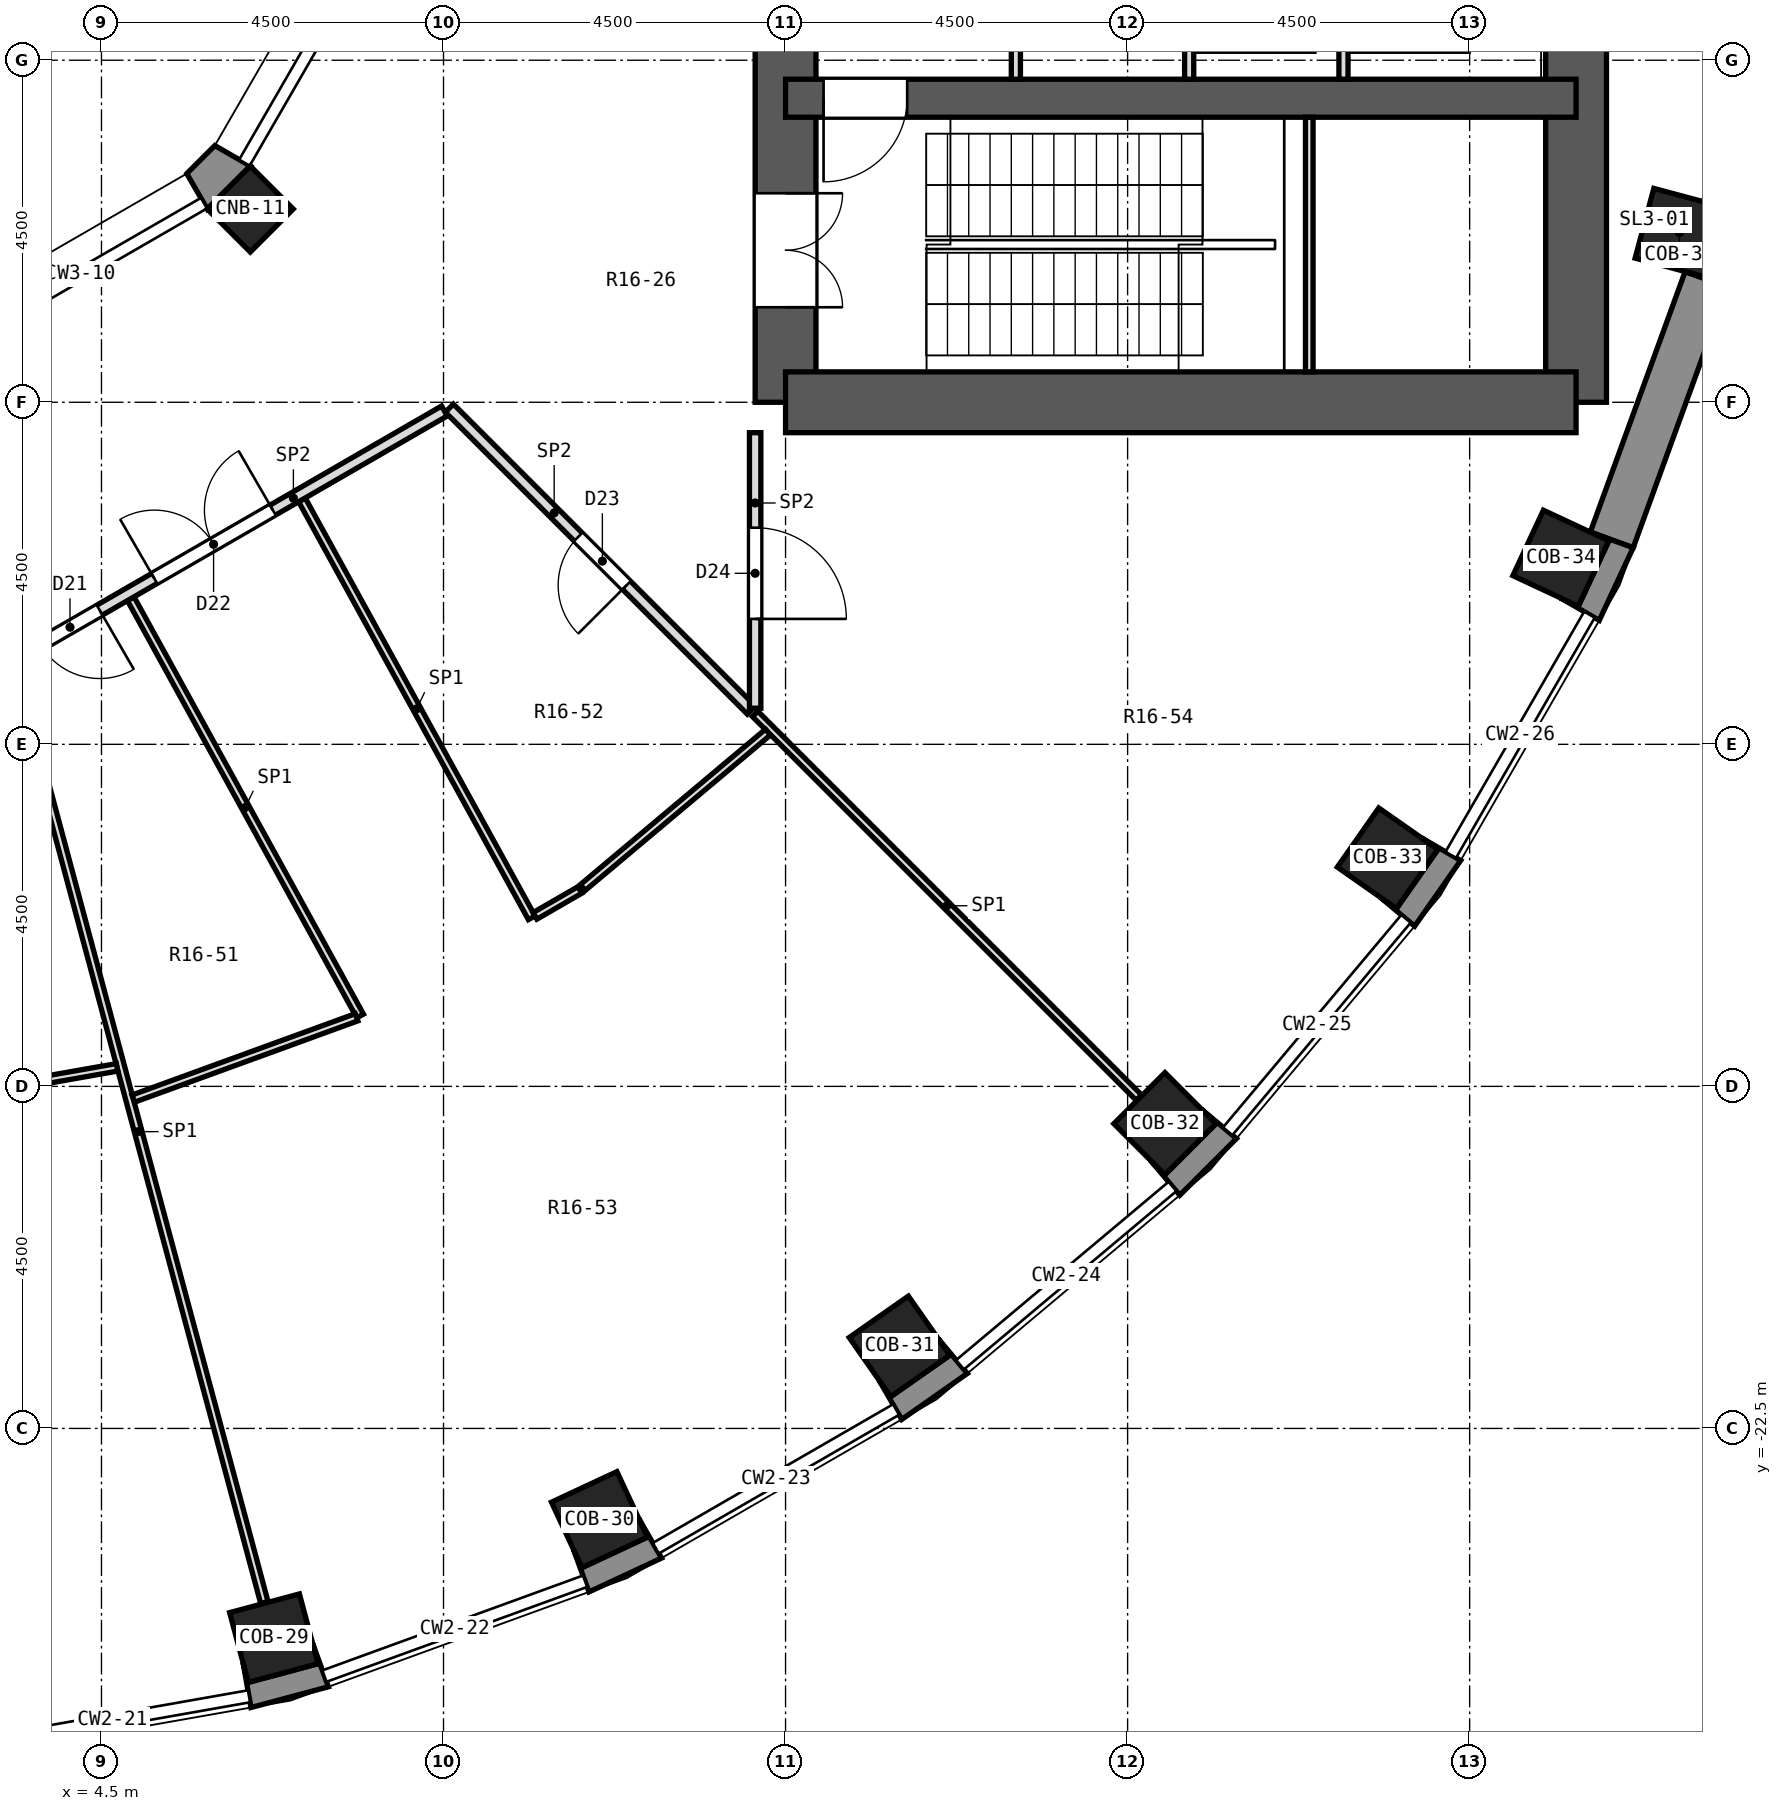
"""IFC4 building model, lengths in metres.
Left out: names, types, materials, properties, quantities, classifications, styles, units other than length and angle.
Written with IfcOpenShell. Run it as: python <this file> out.ifc"""

import sys

from ifc_helpers import new_model, si_unit, direction, frame, frame_2d, origin, origin_2d, place, context, subcontext, project, spatial, polyline, rectangle, outline, extrude, element, fill, save


model = new_model("IFC4")
c1 = context("Model", 3, precision=1e-05, world=origin(), true_north=direction((0.0, 1.0)))
c2 = subcontext(c1, "Body", "Model", "MODEL_VIEW")
j1 = project(units=[si_unit("LENGTHUNIT", "METRE"), si_unit("PLANEANGLEUNIT", "RADIAN")], contexts=[c1])
p1 = place(None, origin())
s1 = spatial("IfcSite", under=j1, at=p1, CompositionType="ELEMENT")
p2 = place(p1, origin())
s2 = spatial("IfcBuilding", under=s1, at=p2, CompositionType="ELEMENT")
p3 = place(p2, frame((0.0, 0.0, 86.9)))
s3 = spatial("IfcBuildingStorey", under=s2, at=p3, CompositionType="ELEMENT", Elevation=86.9)
for number, where, z_axis, x_axis in (
    (1, (6.768, -25.259, -0.55), (0.0, 0.0, 1.0), (0.259, -0.966, 0.0)),
    (2, (11.052, -23.7, -0.55), (0.0, 0.0, 1.0), (0.423, -0.906, 0.0)),
    (3, (14.999, -21.421, -0.55), (0.0, 0.0, 1.0), (0.574, -0.819, 0.0)),
    (4, (18.491, -18.491, -0.55), (0.0, 0.0, 1.0), (0.707, -0.707, 0.0)),
    (5, (21.421, -14.999, -0.55), (0.0, 0.0, 1.0), (0.819, -0.574, 0.0)),
    (6, (23.7, -11.052, -0.55), (0.0, 0.0, 1.0), (0.906, -0.423, 0.0)),
    (7, (25.259, -6.768, -0.55), (0.0, 0.0, 1.0), (0.966, -0.259, 0.0)),
):
    element("IfcColumn", number, at=place(p3, frame(where, z_axis=z_axis, x_axis=x_axis)), inside=s3, PredefinedType="COLUMN", context=c2, shape_type="SweptSolid", body=[
        extrude(rectangle(XDim=0.95, YDim=0.95, at=origin_2d()), origin(), (0.0, 0.0, 1.0), 5.55),
    ])
p4 = place(p3, frame((6.458, -6.458, 0.0), z_axis=(0.0, 0.0, 1.0), x_axis=(0.707106781187, -0.707106781187, 0.0)))
e8 = element("IfcColumn", 8, at=p4, inside=s3, PredefinedType="COLUMN", context=c2, shape_type="SweptSolid", body=[
    extrude(rectangle(XDim=0.8, YDim=0.8, at=origin_2d()), origin(), (0.0, 0.0, 1.0), 5.0),
])
p5 = place(p3, frame((13.5, -9.0, 0.0), z_axis=(0.0, 0.0, 1.0), x_axis=(0.0, 1.0, 0.0)))
e9 = element("IfcWall", 9, at=p5, inside=s3, PredefinedType="SHEAR", context=c2, shape_type="SweptSolid", body=[
    extrude(rectangle(XDim=18.0, YDim=0.8, at=frame_2d((9.0, 0.0))), origin(), (0.0, 0.0, 1.0), 5.0),
])
p6 = place(p5, frame((15.25, 0.0, 0.0)))
e10 = element("IfcOpeningElement", 10, at=p6, cuts=e9, PredefinedType="OPENING", context=c2, shape_type="SweptSolid", body=[
    extrude(rectangle(XDim=1.5, YDim=2.1, at=frame_2d((0.75, 1.05))), frame((0.0, 0.412, 0.0), z_axis=(0.0, -1.0, 0.0), x_axis=(1.0, 0.0, 0.0)), (0.0, 0.0, 1.0), 0.824),
])
p7 = place(p5, frame((1.25, 0.0, 0.0)))
e11 = element("IfcOpeningElement", 11, at=p7, cuts=e9, PredefinedType="OPENING", context=c2, shape_type="SweptSolid", body=[
    extrude(rectangle(XDim=1.5, YDim=2.1, at=frame_2d((0.75, 1.05))), frame((0.0, 0.412, 0.0), z_axis=(0.0, -1.0, 0.0), x_axis=(1.0, 0.0, 0.0)), (0.0, 0.0, 1.0), 0.824),
])
p8 = place(p5, frame((7.5, 0.0, 0.0)))
e12 = element("IfcOpeningElement", 12, at=p8, cuts=e9, PredefinedType="OPENING", context=c2, shape_type="SweptSolid", body=[
    extrude(rectangle(XDim=3.0, YDim=2.4, at=frame_2d((1.5, 1.2))), frame((0.0, 0.412, 0.0), z_axis=(0.0, -1.0, 0.0), x_axis=(1.0, 0.0, 0.0)), (0.0, 0.0, 1.0), 0.824),
])
p9 = place(p3, frame((23.9, -9.0, 0.0), z_axis=(0.0, 0.0, 1.0), x_axis=(0.0, 1.0, 0.0)))
e13 = element("IfcWall", 13, at=p9, inside=s3, PredefinedType="SHEAR", context=c2, shape_type="SweptSolid", body=[
    extrude(rectangle(XDim=18.0, YDim=0.8, at=frame_2d((9.0, 0.0))), origin(), (0.0, 0.0, 1.0), 5.0),
])
p10 = place(p3, frame((13.5, -9.0, 0.0), z_axis=(0.0, 0.0, 1.0), x_axis=(1.0, 0.0, 0.0)))
e14 = element("IfcWall", 14, at=p10, inside=s3, PredefinedType="SHEAR", context=c2, shape_type="SweptSolid", body=[
    extrude(rectangle(XDim=10.4, YDim=0.8, at=frame_2d((5.2, 0.0))), origin(), (0.0, 0.0, 1.0), 5.0),
])
p11 = place(p3, frame((13.5, -5.0, 0.0), z_axis=(0.0, 0.0, 1.0), x_axis=(1.0, 0.0, 0.0)))
e15 = element("IfcWall", 15, at=p11, inside=s3, PredefinedType="SHEAR", context=c2, shape_type="SweptSolid", body=[
    extrude(rectangle(XDim=10.4, YDim=0.5, at=frame_2d((5.2, 0.0))), origin(), (0.0, 0.0, 1.0), 5.0),
])
p12 = place(p11, frame((0.5, 0.0, 0.0)))
e16 = element("IfcOpeningElement", 16, at=p12, cuts=e15, PredefinedType="OPENING", context=c2, shape_type="SweptSolid", body=[
    extrude(rectangle(XDim=1.1, YDim=2.1, at=frame_2d((0.55, 1.05))), frame((0.0, 0.262, 0.0), z_axis=(0.0, -1.0, 0.0), x_axis=(1.0, 0.0, 0.0)), (0.0, 0.0, 1.0), 0.524),
])
p13 = place(p3, frame((24.369, -10.811, 0.0), z_axis=(0.0, 0.0, 1.0), x_axis=(0.341990236633, 0.939703505393, 0.0)))
e17 = element("IfcWall", 17, at=p13, inside=s3, PredefinedType="SOLIDWALL", context=c2, shape_type="SweptSolid", body=[
    extrude(rectangle(XDim=3.648, YDim=0.6, at=frame_2d((1.824, 0.0))), origin(), (0.0, 0.0, 1.0), 4.5),
])
p14 = place(p3, origin())
e18 = element("IfcWall", 18, at=p14, inside=s3, PredefinedType="SOLIDWALL", context=c2, shape_type="SweptSolid", body=[
    extrude(outline(polyline([(6.467, -26.172), (7.486, -25.899), (7.28, -25.335), (7.35, -25.595), (6.432, -25.841), (6.363, -25.581), (6.467, -26.172)])), origin(), (0.0, 0.0, 1.0), 4.5),
])
p15 = place(p3, origin())
e19 = element("IfcWall", 19, at=p15, inside=s3, PredefinedType="SOLIDWALL", context=c2, shape_type="SweptSolid", body=[
    extrude(outline(polyline([(10.913, -24.651), (11.869, -24.206), (11.569, -23.686), (11.683, -23.93), (10.822, -24.331), (10.708, -24.087), (10.913, -24.651)])), origin(), (0.0, 0.0, 1.0), 4.5),
])
p16 = place(p3, origin())
e20 = element("IfcWall", 20, at=p16, inside=s3, PredefinedType="SOLIDWALL", context=c2, shape_type="SweptSolid", body=[
    extrude(outline(polyline([(15.892, -21.777), (15.506, -21.317), (15.661, -21.538), (14.882, -22.083), (14.728, -21.862), (15.028, -22.382), (15.892, -21.777)])), origin(), (0.0, 0.0, 1.0), 4.5),
])
p17 = place(p3, origin())
e21 = element("IfcWall", 21, at=p17, inside=s3, PredefinedType="SOLIDWALL", context=c2, shape_type="SweptSolid", body=[
    extrude(outline(polyline([(18.686, -19.432), (19.432, -18.686), (18.972, -18.301), (19.163, -18.491), (18.491, -19.163), (18.301, -18.972), (18.686, -19.432)])), origin(), (0.0, 0.0, 1.0), 4.5),
])
p18 = place(p3, origin())
e22 = element("IfcWall", 22, at=p18, inside=s3, PredefinedType="SOLIDWALL", context=c2, shape_type="SweptSolid", body=[
    extrude(outline(polyline([(22.382, -15.028), (21.862, -14.728), (22.083, -14.882), (21.538, -15.661), (21.317, -15.506), (21.777, -15.892), (22.382, -15.028)])), origin(), (0.0, 0.0, 1.0), 4.5),
])
p19 = place(p3, origin())
e23 = element("IfcWall", 23, at=p19, inside=s3, PredefinedType="SOLIDWALL", context=c2, shape_type="SweptSolid", body=[
    extrude(outline(polyline([(24.651, -10.913), (24.087, -10.708), (24.331, -10.822), (23.93, -11.683), (23.686, -11.569), (24.206, -11.869), (24.651, -10.913)])), origin(), (0.0, 0.0, 1.0), 4.5),
])
p20 = place(p3, origin())
e24 = element("IfcWall", 24, at=p20, inside=s3, PredefinedType="SOLIDWALL", context=c2, shape_type="SweptSolid", body=[
    extrude(outline(polyline([(25.899, -7.486), (26.172, -6.467), (25.581, -6.363), (25.841, -6.432), (25.595, -7.35), (25.335, -7.28), (25.899, -7.486)])), origin(), (0.0, 0.0, 1.0), 4.5),
])
p21 = place(p3, origin())
e25 = element("IfcWall", 25, at=p21, inside=s3, PredefinedType="SOLIDWALL", context=c2, shape_type="SweptSolid", body=[
    extrude(outline(polyline([(5.892, -6.458), (6.458, -5.892), (5.991, -5.623), (5.623, -5.991), (5.892, -6.458)])), origin(), (0.0, 0.0, 1.0), 4.5),
])
p22 = place(p3, frame((3.323, -12.4, 0.0), z_axis=(0.0, 0.0, 1.0), x_axis=(0.258784286108, -0.965935139263, 0.0)))
e26 = element("IfcWall", 26, at=p22, inside=s3, PredefinedType="PARTITIONING", context=c2, shape_type="SweptSolid", body=[
    extrude(rectangle(XDim=12.828, YDim=0.1, at=frame_2d((6.414, 0.0))), origin(), (0.0, 0.0, 1.0), 4.5),
])
p23 = place(p3, frame((4.885, -11.585, 0.0), z_axis=(0.0, 0.0, 1.0), x_axis=(0.481793071414, -0.876285020035, 0.0)))
e27 = element("IfcWall", 27, at=p23, inside=s3, PredefinedType="PARTITIONING", context=c2, shape_type="SweptSolid", body=[
    extrude(rectangle(XDim=6.264, YDim=0.1, at=frame_2d((3.132, 0.0))), origin(), (0.0, 0.0, 1.0), 4.5),
])
p24 = place(p3, frame((7.137, -10.284, 0.0), z_axis=(0.0, 0.0, 1.0), x_axis=(0.481752941383, -0.876307082859, 0.0)))
e28 = element("IfcWall", 28, at=p24, inside=s3, PredefinedType="PARTITIONING", context=c2, shape_type="SweptSolid", body=[
    extrude(rectangle(XDim=6.274, YDim=0.1, at=frame_2d((3.137, 0.0))), origin(), (0.0, 0.0, 1.0), 4.5),
])
p25 = place(p3, frame((13.1, -13.1, 0.0), z_axis=(0.0, 0.0, 1.0), x_axis=(0.707106781187, -0.707106781187, 0.0)))
e29 = element("IfcWall", 29, at=p25, inside=s3, PredefinedType="PARTITIONING", context=c2, shape_type="SweptSolid", body=[
    extrude(rectangle(XDim=7.139, YDim=0.1, at=frame_2d((3.569, 0.0))), origin(), (0.0, 0.0, 1.0), 4.5),
])
p26 = place(p3, frame((9.077, -9.077, 0.0), z_axis=(0.0, 0.0, 1.0), x_axis=(0.707106781187, -0.707106781187, 0.0)))
e30 = element("IfcWall", 30, at=p26, inside=s3, PredefinedType="PARTITIONING", context=c2, shape_type="SweptSolid", body=[
    extrude(rectangle(XDim=5.62, YDim=0.15, at=frame_2d((2.81, 0.0))), origin(), (0.0, 0.0, 1.0), 4.5),
])
p27 = place(p26, frame((2.396, 0.0, 0.0)))
e31 = element("IfcOpeningElement", 31, at=p27, cuts=e30, PredefinedType="OPENING", context=c2, shape_type="SweptSolid", body=[
    extrude(rectangle(XDim=0.9, YDim=2.1, at=frame_2d((0.45, 1.05))), frame((0.0, 0.087, 0.0), z_axis=(0.0, -1.0, 0.0), x_axis=(1.0, 0.0, 0.0)), (0.0, 0.0, 1.0), 0.174),
])
p28 = place(p3, frame((1.65, -18.288, 0.0), z_axis=(0.0, 0.0, 1.0), x_axis=(0.984810487744, 0.173632667516, 0.0)))
e32 = element("IfcWall", 32, at=p28, inside=s3, PredefinedType="PARTITIONING", context=c2, shape_type="SweptSolid", body=[
    extrude(rectangle(XDim=3.102, YDim=0.1, at=frame_2d((1.551, 0.0))), origin(), (0.0, 0.0, 1.0), 4.5),
])
p29 = place(p3, frame((4.918, -18.161, 0.0), z_axis=(0.0, 0.0, 1.0), x_axis=(0.93964286716, 0.342156809365, 0.0)))
e33 = element("IfcWall", 33, at=p29, inside=s3, PredefinedType="PARTITIONING", context=c2, shape_type="SweptSolid", body=[
    extrude(rectangle(XDim=3.127, YDim=0.1, at=frame_2d((1.563, 0.0))), origin(), (0.0, 0.0, 1.0), 4.5),
])
p30 = place(p3, frame((10.203, -15.757, 0.0), z_axis=(0.0, 0.0, 1.0), x_axis=(0.865964989499, 0.500104626015, 0.0)))
e34 = element("IfcWall", 34, at=p30, inside=s3, PredefinedType="PARTITIONING", context=c2, shape_type="SweptSolid", body=[
    extrude(rectangle(XDim=0.682, YDim=0.1, at=frame_2d((0.341, 0.0))), origin(), (0.0, 0.0, 1.0), 4.5),
])
p31 = place(p3, frame((3.388, -12.363, 0.0), z_axis=(0.0, 0.0, 1.0), x_axis=(0.865967095912, 0.5001009786, 0.0)))
e35 = element("IfcWall", 35, at=p31, inside=s3, PredefinedType="PARTITIONING", context=c2, shape_type="SweptSolid", body=[
    extrude(rectangle(XDim=6.495, YDim=0.15, at=frame_2d((3.248, 0.0))), origin(), (0.0, 0.0, 1.0), 4.5),
])
p32 = place(p31, frame((0.356, 0.0, 0.0)))
e36 = element("IfcOpeningElement", 36, at=p32, cuts=e35, PredefinedType="OPENING", context=c2, shape_type="SweptSolid", body=[
    extrude(rectangle(XDim=0.9, YDim=2.1, at=frame_2d((0.45, 1.05))), frame((0.0, 0.087, 0.0), z_axis=(0.0, -1.0, 0.0), x_axis=(1.0, 0.0, 0.0)), (0.0, 0.0, 1.0), 0.174),
])
p33 = place(p31, frame((2.087, 0.0, 0.0)))
e37 = element("IfcOpeningElement", 37, at=p33, cuts=e35, PredefinedType="OPENING", context=c2, shape_type="SweptSolid", body=[
    extrude(rectangle(XDim=1.8, YDim=2.1, at=frame_2d((0.9, 1.05))), frame((0.0, 0.087, 0.0), z_axis=(0.0, -1.0, 0.0), x_axis=(1.0, 0.0, 0.0)), (0.0, 0.0, 1.0), 0.174),
])
p34 = place(p3, frame((10.832, -15.384, 0.0), z_axis=(0.0, 0.0, 1.0), x_axis=(0.766014747924, 0.642822997381, 0.0)))
e38 = element("IfcWall", 38, at=p34, inside=s3, PredefinedType="PARTITIONING", context=c2, shape_type="SweptSolid", body=[
    extrude(rectangle(XDim=3.181, YDim=0.1, at=frame_2d((1.59, 0.0))), origin(), (0.0, 0.0, 1.0), 4.5),
])
p35 = place(p3, frame((13.1, -13.025, 0.0), z_axis=(0.0, 0.0, 1.0), x_axis=(0.0, 1.0, 0.0)))
e39 = element("IfcWall", 39, at=p35, inside=s3, PredefinedType="PARTITIONING", context=c2, shape_type="SweptSolid", body=[
    extrude(rectangle(XDim=3.625, YDim=0.15, at=frame_2d((1.812, 0.0))), origin(), (0.0, 0.0, 1.0), 4.5),
])
p36 = place(p35, frame((1.175, 0.0, 0.0)))
e40 = element("IfcOpeningElement", 40, at=p36, cuts=e39, PredefinedType="OPENING", context=c2, shape_type="SweptSolid", body=[
    extrude(rectangle(XDim=1.2, YDim=2.1, at=frame_2d((0.6, 1.05))), frame((0.0, 0.087, 0.0), z_axis=(0.0, -1.0, 0.0), x_axis=(1.0, 0.0, 0.0)), (0.0, 0.0, 1.0), 0.174),
])
p37 = place(p3, frame((16.53, -4.75, 0.0), z_axis=(0.0, 0.0, 1.0), x_axis=(0.0, 1.0, 0.0)))
e41 = element("IfcWall", 41, at=p37, inside=s3, PredefinedType="PARTITIONING", context=c2, shape_type="SweptSolid", body=[
    extrude(rectangle(XDim=2.5, YDim=0.12, at=frame_2d((1.25, 0.0))), origin(), (0.0, 0.0, 1.0), 4.5),
])
p38 = place(p37, frame((0.7, 0.0, 0.0)))
e42 = element("IfcOpeningElement", 42, at=p38, cuts=e41, PredefinedType="OPENING", context=c2, shape_type="SweptSolid", body=[
    extrude(rectangle(XDim=1.1, YDim=2.1, at=frame_2d((0.55, 1.05))), frame((0.0, 0.072, 0.0), z_axis=(0.0, -1.0, 0.0), x_axis=(1.0, 0.0, 0.0)), (0.0, 0.0, 1.0), 0.144),
])
for number, where, z_axis, x_axis in (
    (43, (18.81, -4.75, 0.0), (0.0, 0.0, 1.0), (0.0, 1.0, 0.0)),
    (44, (20.84, -4.75, 0.0), (0.0, 0.0, 1.0), (0.0, 1.0, 0.0)),
):
    element("IfcWall", number, at=place(p3, frame(where, z_axis=z_axis, x_axis=x_axis)), inside=s3, PredefinedType="PARTITIONING", context=c2, shape_type="SweptSolid", body=[
        extrude(rectangle(XDim=2.5, YDim=0.12, at=frame_2d((1.25, 0.0))), origin(), (0.0, 0.0, 1.0), 4.5),
    ])
p39 = place(p3, frame((20.39, -8.6, 0.0), z_axis=(0.0, 0.0, 1.0), x_axis=(0.0, 1.0, 0.0)))
e45 = element("IfcWall", 45, at=p39, inside=s3, PredefinedType="PARTITIONING", context=c2, shape_type="SweptSolid", body=[
    extrude(rectangle(XDim=3.35, YDim=0.1, at=frame_2d((1.675, 0.0))), origin(), (0.0, 0.0, 1.0), 4.5),
])
p40 = place(p32, frame((0.9, 0.0, 0.0), z_axis=(0.0, 0.0, 1.0), x_axis=(-1.0, 0.0, 0.0)))
e46 = element("IfcDoor", 46, at=p40, inside=s3, OperationType="SINGLE_SWING_LEFT", PredefinedType="DOOR", context=c2, shape_type="SweptSolid", body=[
    extrude(rectangle(XDim=0.9, YDim=2.1, at=frame_2d((0.45, 1.05))), frame((0.0, 0.025, 0.0), z_axis=(0.0, -1.0, 0.0), x_axis=(1.0, 0.0, 0.0)), (0.0, 0.0, 1.0), 0.05),
])
fill(e36, e46)
p41 = place(p33, origin())
e47 = element("IfcDoor", 47, at=p41, inside=s3, OperationType="DOUBLE_DOOR_SINGLE_SWING", PredefinedType="DOOR", context=c2, shape_type="SweptSolid", body=[
    extrude(rectangle(XDim=1.8, YDim=2.1, at=frame_2d((0.9, 1.05))), frame((0.0, 0.025, 0.0), z_axis=(0.0, -1.0, 0.0), x_axis=(1.0, 0.0, 0.0)), (0.0, 0.0, 1.0), 0.05),
])
fill(e37, e47)
p42 = place(p27, frame((0.9, 0.0, 0.0), z_axis=(0.0, 0.0, 1.0), x_axis=(-1.0, 0.0, 0.0)))
e48 = element("IfcDoor", 48, at=p42, inside=s3, OperationType="SINGLE_SWING_LEFT", PredefinedType="DOOR", context=c2, shape_type="SweptSolid", body=[
    extrude(rectangle(XDim=0.9, YDim=2.1, at=frame_2d((0.45, 1.05))), frame((0.0, 0.025, 0.0), z_axis=(0.0, -1.0, 0.0), x_axis=(1.0, 0.0, 0.0)), (0.0, 0.0, 1.0), 0.05),
])
fill(e31, e48)
p43 = place(p36, frame((1.2, 0.0, 0.0), z_axis=(0.0, 0.0, 1.0), x_axis=(-1.0, 0.0, 0.0)))
e49 = element("IfcDoor", 49, at=p43, inside=s3, OperationType="SINGLE_SWING_RIGHT", PredefinedType="DOOR", context=c2, shape_type="SweptSolid", body=[
    extrude(rectangle(XDim=1.2, YDim=2.1, at=frame_2d((0.6, 1.05))), frame((0.0, 0.025, 0.0), z_axis=(0.0, -1.0, 0.0), x_axis=(1.0, 0.0, 0.0)), (0.0, 0.0, 1.0), 0.05),
])
fill(e40, e49)
p44 = place(p12, frame((1.1, 0.0, 0.0), z_axis=(0.0, 0.0, 1.0), x_axis=(-1.0, 0.0, 0.0)))
e50 = element("IfcDoor", 50, at=p44, inside=s3, OperationType="SINGLE_SWING_RIGHT", PredefinedType="DOOR", context=c2, shape_type="SweptSolid", body=[
    extrude(rectangle(XDim=1.1, YDim=2.1, at=frame_2d((0.55, 1.05))), frame((0.0, 0.025, 0.0), z_axis=(0.0, -1.0, 0.0), x_axis=(1.0, 0.0, 0.0)), (0.0, 0.0, 1.0), 0.05),
])
fill(e16, e50)
p45 = place(p7, frame((1.5, 0.0, 0.0), z_axis=(0.0, 0.0, 1.0), x_axis=(-1.0, 0.0, 0.0)))
e51 = element("IfcDoor", 51, at=p45, inside=s3, OperationType="DOUBLE_DOOR_SINGLE_SWING", PredefinedType="DOOR", context=c2, shape_type="SweptSolid", body=[
    extrude(rectangle(XDim=1.5, YDim=2.1, at=frame_2d((0.75, 1.05))), frame((0.0, 0.025, 0.0), z_axis=(0.0, -1.0, 0.0), x_axis=(1.0, 0.0, 0.0)), (0.0, 0.0, 1.0), 0.05),
])
fill(e11, e51)
save(model, sys.argv[1])
